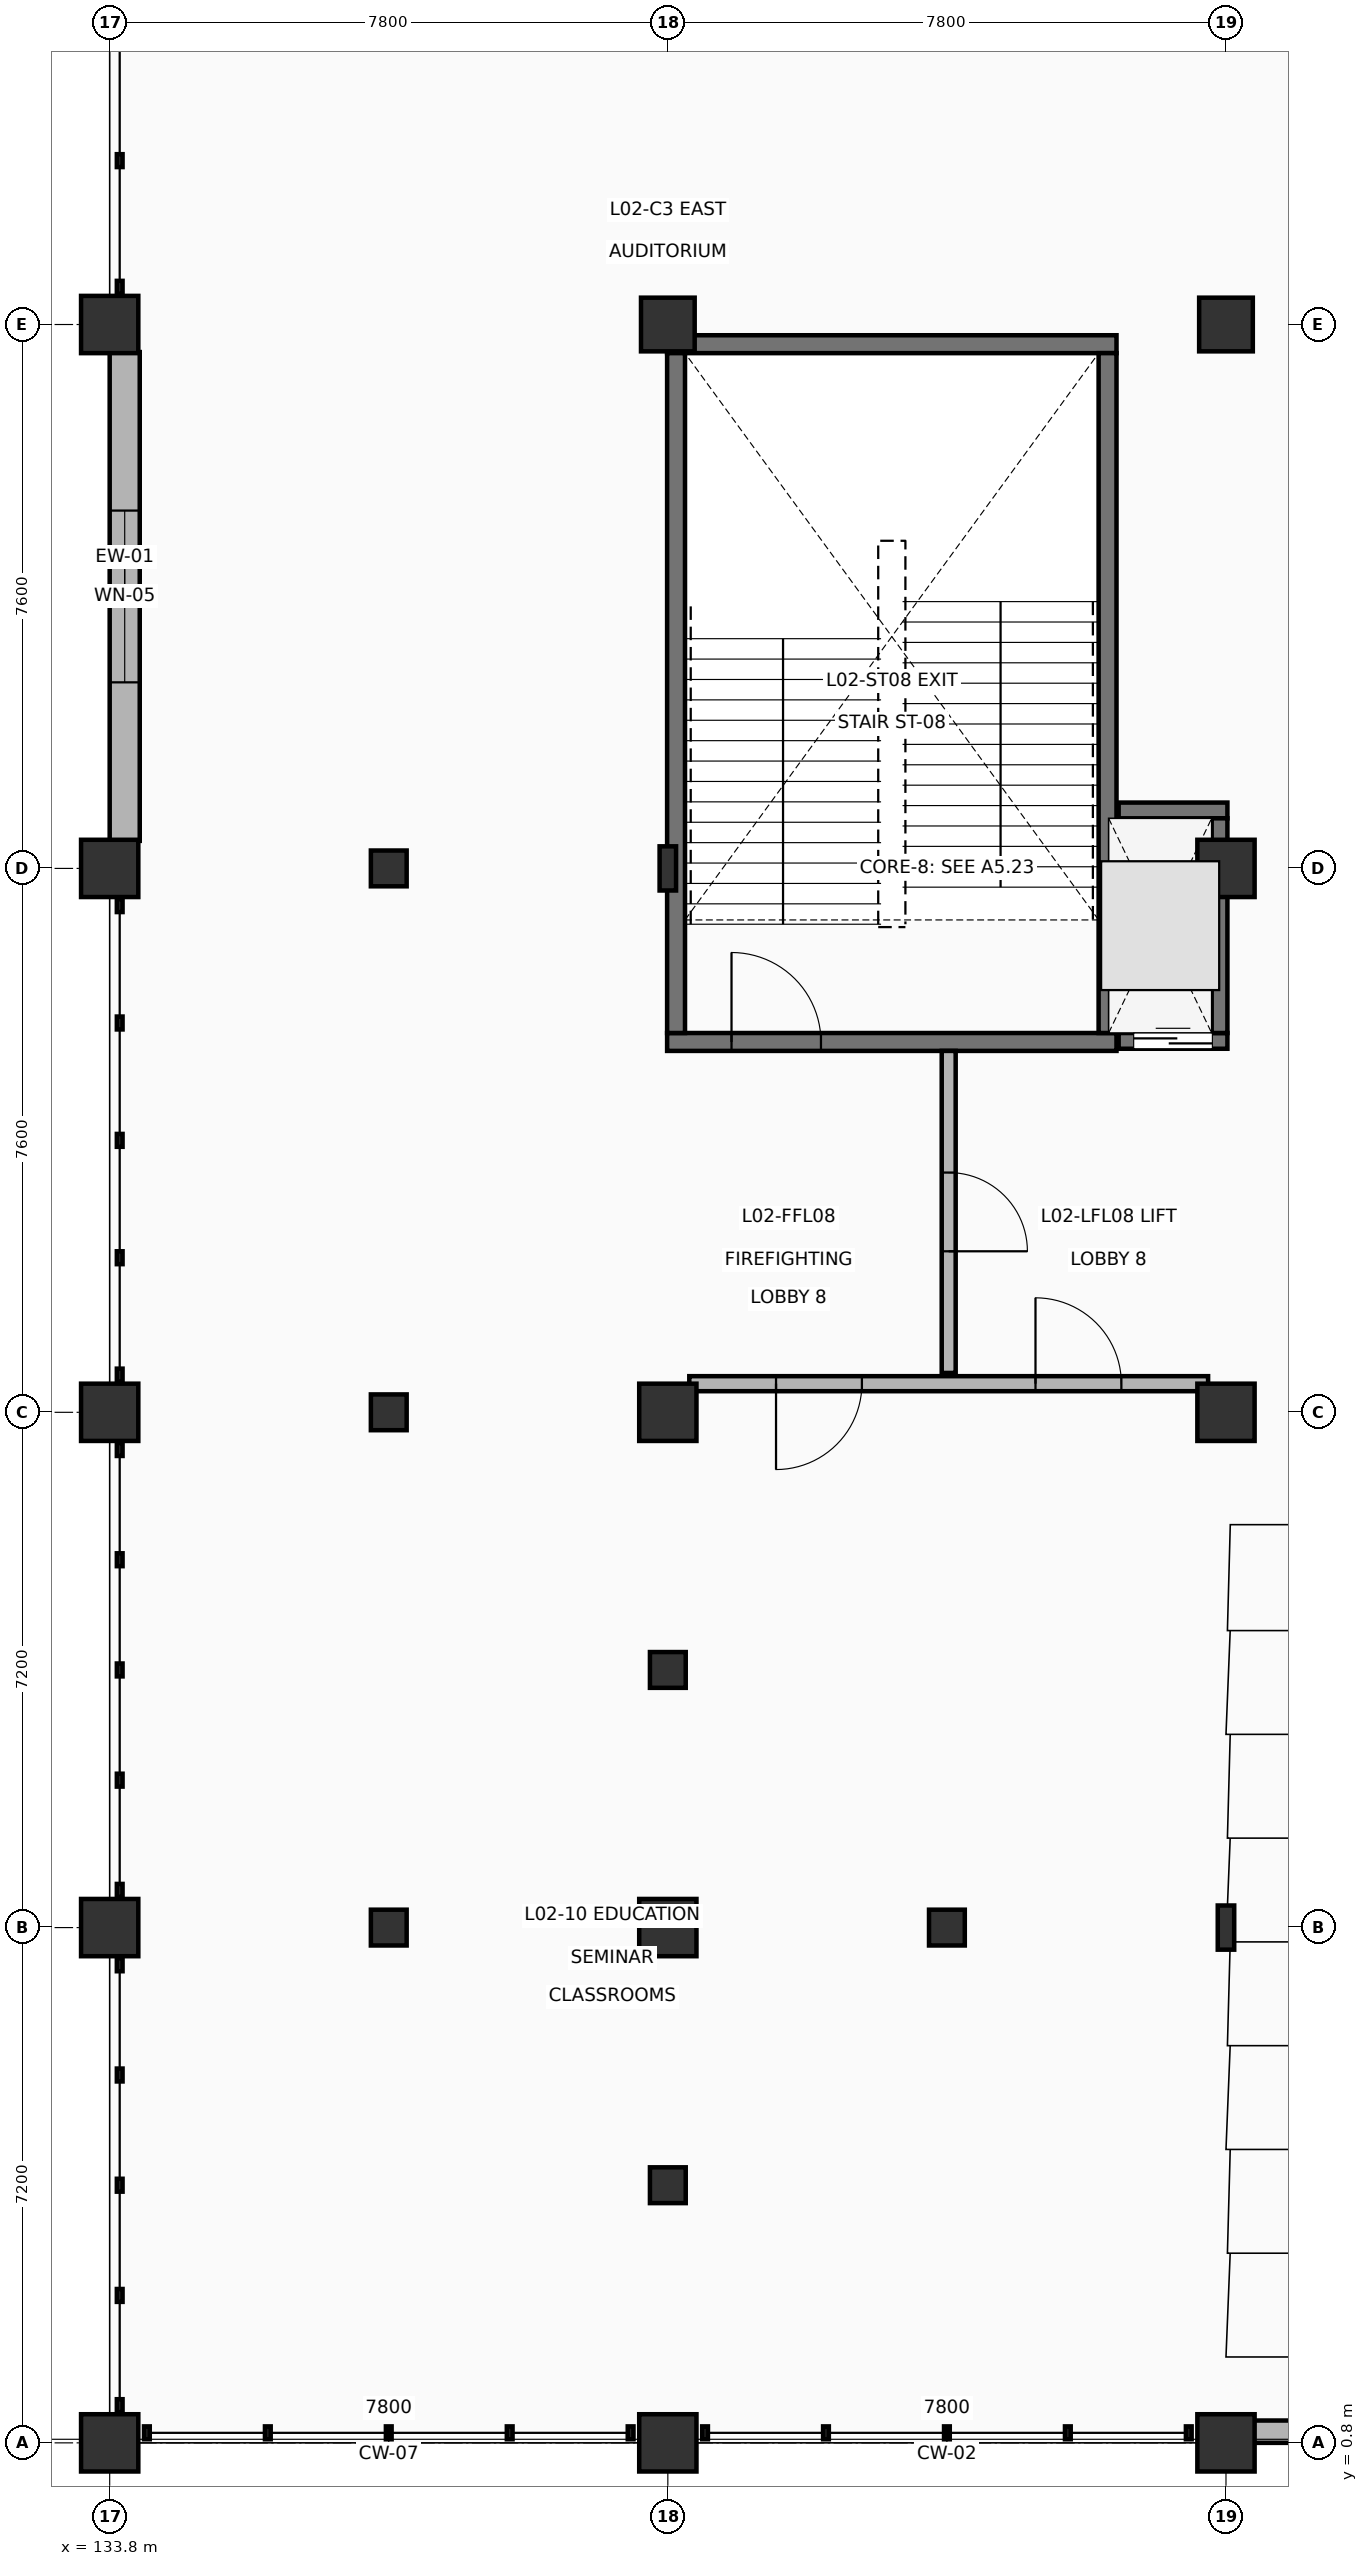
"""IFC4 building model, lengths in metres.
Left out: names, types, materials, properties, quantities, classifications, styles, units other than length and angle.
Written with IfcOpenShell. Run it as: python <this file> out.ifc"""

import sys

from ifc_helpers import new_model, si_unit, direction, frame, frame_2d, origin, origin_2d, place, context, subcontext, project, spatial, rectangle, circle, i_section, extrude, element, fill, save


model = new_model("IFC4")
c1 = context("Model", 3, precision=1e-05, world=origin(), true_north=direction((0.0, 1.0)))
c2 = subcontext(c1, "Body", "Model", "MODEL_VIEW")
j1 = project(units=[si_unit("LENGTHUNIT", "METRE"), si_unit("PLANEANGLEUNIT", "RADIAN")], contexts=[c1])
p1 = place(None, origin())
s1 = spatial("IfcSite", under=j1, at=p1, CompositionType="ELEMENT")
p2 = place(p1, origin())
s2 = spatial("IfcBuilding", under=s1, at=p2, CompositionType="ELEMENT")
p3 = place(p2, frame((0.0, 0.0, 5.4)))
s3 = spatial("IfcBuildingStorey", under=s2, at=p3, CompositionType="ELEMENT", Elevation=5.4)
p4 = place(p3, frame((133.8, 0.8, 0.0), z_axis=(0.0, 0.0, 1.0), x_axis=(1.0, 0.0, 0.0)))
e1 = element("IfcColumn", 1, at=p4, inside=s3, PredefinedType="COLUMN", context=c2, shape_type="SweptSolid", body=[
    extrude(rectangle(XDim=0.8, YDim=0.8, at=origin_2d()), origin(), (0.0, 0.0, 1.0), 4.84),
])
for number, where, z_axis, x_axis in (
    (2, (133.8, 8.0, 0.0), (0.0, 0.0, 1.0), (1.0, 0.0, 0.0)),
    (3, (133.8, 15.2, 0.0), (0.0, 0.0, 1.0), (1.0, 0.0, 0.0)),
    (4, (133.8, 22.8, 0.0), (0.0, 0.0, 1.0), (1.0, 0.0, 0.0)),
    (5, (133.8, 30.4, 0.0), (0.0, 0.0, 1.0), (1.0, 0.0, 0.0)),
):
    element("IfcColumn", number, at=place(p3, frame(where, z_axis=z_axis, x_axis=x_axis)), inside=s3, PredefinedType="COLUMN", context=c2, shape_type="SweptSolid", body=[
        extrude(rectangle(XDim=0.8, YDim=0.8, at=origin_2d()), origin(), (0.0, 0.0, 1.0), 5.1),
    ])
p5 = place(p3, frame((141.6, 0.8, 0.0), z_axis=(0.0, 0.0, 1.0), x_axis=(1.0, 0.0, 0.0)))
e6 = element("IfcColumn", 6, at=p5, inside=s3, PredefinedType="COLUMN", context=c2, shape_type="SweptSolid", body=[
    extrude(rectangle(XDim=0.8, YDim=0.8, at=origin_2d()), origin(), (0.0, 0.0, 1.0), 4.84),
])
for number, where, z_axis, x_axis in (
    (7, (141.6, 8.0, 0.0), (0.0, 0.0, 1.0), (1.0, 0.0, 0.0)),
    (8, (141.6, 15.2, 0.0), (0.0, 0.0, 1.0), (1.0, 0.0, 0.0)),
):
    element("IfcColumn", number, at=place(p3, frame(where, z_axis=z_axis, x_axis=x_axis)), inside=s3, PredefinedType="COLUMN", context=c2, shape_type="SweptSolid", body=[
        extrude(rectangle(XDim=0.8, YDim=0.8, at=origin_2d()), origin(), (0.0, 0.0, 1.0), 5.1),
    ])
p6 = place(p3, frame((141.6, 22.8, 0.0), z_axis=(0.0, 0.0, 1.0), x_axis=(1.0, 0.0, 0.0)))
e9 = element("IfcColumn", 9, at=p6, inside=s3, PredefinedType="COLUMN", context=c2, shape_type="SweptSolid", body=[
    extrude(i_section(OverallWidth=0.23, OverallDepth=0.617, WebThickness=0.013, FlangeThickness=0.022, at=origin_2d()), origin(), (0.0, 0.0, 1.0), 5.1),
])
p7 = place(p3, frame((141.6, 30.4, 0.0), z_axis=(0.0, 0.0, 1.0), x_axis=(1.0, 0.0, 0.0)))
e10 = element("IfcColumn", 10, at=p7, inside=s3, PredefinedType="COLUMN", context=c2, shape_type="SweptSolid", body=[
    extrude(circle(Radius=0.375, at=origin_2d()), origin(), (0.0, 0.0, 1.0), 5.1),
])
p8 = place(p3, frame((149.4, 0.8, 0.0), z_axis=(0.0, 0.0, 1.0), x_axis=(1.0, 0.0, 0.0)))
e11 = element("IfcColumn", 11, at=p8, inside=s3, PredefinedType="COLUMN", context=c2, shape_type="SweptSolid", body=[
    extrude(rectangle(XDim=0.8, YDim=0.8, at=origin_2d()), origin(), (0.0, 0.0, 1.0), 4.84),
])
p9 = place(p3, frame((149.4, 8.0, 0.0), z_axis=(0.0, 0.0, 1.0), x_axis=(1.0, 0.0, 0.0)))
e12 = element("IfcColumn", 12, at=p9, inside=s3, PredefinedType="COLUMN", context=c2, shape_type="SweptSolid", body=[
    extrude(i_section(OverallWidth=0.23, OverallDepth=0.617, WebThickness=0.013, FlangeThickness=0.022, at=origin_2d()), origin(), (0.0, 0.0, 1.0), 5.1),
])
for number, where, z_axis, x_axis in (
    (13, (149.4, 15.2, 0.0), (0.0, 0.0, 1.0), (1.0, 0.0, 0.0)),
    (14, (149.4, 22.8, 0.0), (0.0, 0.0, 1.0), (1.0, 0.0, 0.0)),
):
    element("IfcColumn", number, at=place(p3, frame(where, z_axis=z_axis, x_axis=x_axis)), inside=s3, PredefinedType="COLUMN", context=c2, shape_type="SweptSolid", body=[
        extrude(rectangle(XDim=0.8, YDim=0.8, at=origin_2d()), origin(), (0.0, 0.0, 1.0), 5.1),
    ])
p10 = place(p3, frame((149.4, 30.4, 0.0), z_axis=(0.0, 0.0, 1.0), x_axis=(1.0, 0.0, 0.0)))
e15 = element("IfcColumn", 15, at=p10, inside=s3, PredefinedType="COLUMN", context=c2, shape_type="SweptSolid", body=[
    extrude(circle(Radius=0.375, at=origin_2d()), origin(), (0.0, 0.0, 1.0), 4.84),
])
for number, where, z_axis, x_axis in (
    (16, (137.7, 8.0, 0.0), (0.0, 0.0, 1.0), (1.0, 0.0, 0.0)),
    (17, (137.7, 15.2, 0.0), (0.0, 0.0, 1.0), (1.0, 0.0, 0.0)),
    (18, (137.7, 22.8, 0.0), (0.0, 0.0, 1.0), (1.0, 0.0, 0.0)),
    (19, (145.5, 8.0, 0.0), (0.0, 0.0, 1.0), (1.0, 0.0, 0.0)),
    (20, (141.6, 4.4, 0.0), (0.0, 0.0, 1.0), (1.0, 0.0, 0.0)),
    (21, (141.6, 11.6, 0.0), (0.0, 0.0, 1.0), (1.0, 0.0, 0.0)),
):
    element("IfcColumn", number, at=place(p3, frame(where, z_axis=z_axis, x_axis=x_axis)), inside=s3, PredefinedType="COLUMN", context=c2, shape_type="SweptSolid", body=[
        extrude(rectangle(XDim=0.5, YDim=0.5, at=origin_2d()), origin(), (0.0, 0.0, 1.0), 4.84),
    ])
p11 = place(p3, frame((156.815, 0.956, 0.0), z_axis=(0.0, 0.0, 1.0), x_axis=(-1.0, 0.0, 0.0)))
e22 = element("IfcWall", 22, at=p11, inside=s3, PredefinedType="SOLIDWALL", context=c2, shape_type="SweptSolid", body=[
    extrude(rectangle(XDim=7.03, YDim=0.312, at=frame_2d((3.515, 0.0))), origin(), (0.0, 0.0, 1.0), 4.585),
])
p12 = place(p3, frame((134.01, 23.185, 0.0), z_axis=(0.0, 0.0, 1.0), x_axis=(0.0, 1.0, 0.0)))
e23 = element("IfcWall", 23, at=p12, inside=s3, PredefinedType="SOLIDWALL", context=c2, shape_type="SweptSolid", body=[
    extrude(rectangle(XDim=6.83, YDim=0.42, at=frame_2d((3.415, 0.0))), origin(), (0.0, 0.0, 1.0), 4.585),
])
p13 = place(p12, frame((2.215, 0.0, 0.95)))
e24 = element("IfcOpeningElement", 24, at=p13, cuts=e23, PredefinedType="OPENING", context=c2, shape_type="SweptSolid", body=[
    extrude(rectangle(XDim=2.4, YDim=2.1, at=frame_2d((1.2, 1.05))), frame((0.0, 0.22, 0.0), z_axis=(0.0, -1.0, 0.0), x_axis=(1.0, 0.0, 0.0)), (0.0, 0.0, 1.0), 0.44),
])
p14 = place(p3, frame((141.59, 20.375, 0.0), z_axis=(0.0, 0.0, 1.0), x_axis=(1.0, 0.0, 0.0)))
e25 = element("IfcWall", 25, at=p14, inside=s3, PredefinedType="SHEAR", context=c2, shape_type="SweptSolid", body=[
    extrude(rectangle(XDim=6.28, YDim=0.25, at=frame_2d((3.14, 0.0))), origin(), (0.0, 0.0, 1.0), 4.84),
])
p15 = place(p14, frame((0.9, 0.0, 0.0)))
e26 = element("IfcOpeningElement", 26, at=p15, cuts=e25, PredefinedType="OPENING", context=c2, shape_type="SweptSolid", body=[
    extrude(rectangle(XDim=1.25, YDim=2.2, at=frame_2d((0.625, 1.1))), frame((0.0, 0.135, 0.0), z_axis=(0.0, -1.0, 0.0), x_axis=(1.0, 0.0, 0.0)), (0.0, 0.0, 1.0), 0.27),
])
p16 = place(p3, frame((141.59, 30.125, 0.0), z_axis=(0.0, 0.0, 1.0), x_axis=(1.0, 0.0, 0.0)))
e27 = element("IfcWall", 27, at=p16, inside=s3, PredefinedType="SHEAR", context=c2, shape_type="SweptSolid", body=[
    extrude(rectangle(XDim=6.28, YDim=0.25, at=frame_2d((3.14, 0.0))), origin(), (0.0, 0.0, 1.0), 4.84),
])
for number, where, z_axis, x_axis in (
    (28, (141.715, 20.5, 0.0), (0.0, 0.0, 1.0), (0.0, 1.0, 0.0)),
    (29, (147.745, 20.5, 0.0), (0.0, 0.0, 1.0), (0.0, 1.0, 0.0)),
):
    element("IfcWall", number, at=place(p3, frame(where, z_axis=z_axis, x_axis=x_axis)), inside=s3, PredefinedType="SHEAR", context=c2, shape_type="SweptSolid", body=[
        extrude(rectangle(XDim=9.5, YDim=0.25, at=frame_2d((4.75, 0.0))), origin(), (0.0, 0.0, 1.0), 4.84),
    ])
p17 = place(p3, frame((147.9, 20.39, 0.0), z_axis=(0.0, 0.0, 1.0), x_axis=(1.0, 0.0, 0.0)))
e30 = element("IfcWall", 30, at=p17, inside=s3, PredefinedType="SHEAR", context=c2, shape_type="SweptSolid", body=[
    extrude(rectangle(XDim=1.52, YDim=0.22, at=frame_2d((0.76, 0.0))), origin(), (0.0, 0.0, 1.0), 4.84),
])
p18 = place(p17, frame((0.21, 0.0, 0.0)))
e31 = element("IfcOpeningElement", 31, at=p18, cuts=e30, PredefinedType="OPENING", context=c2, shape_type="SweptSolid", body=[
    extrude(rectangle(XDim=1.1, YDim=2.15, at=frame_2d((0.55, 1.075))), frame((0.0, 0.12, 0.0), z_axis=(0.0, -1.0, 0.0), x_axis=(1.0, 0.0, 0.0)), (0.0, 0.0, 1.0), 0.24),
])
p19 = place(p3, frame((147.9, 23.61, 0.0), z_axis=(0.0, 0.0, 1.0), x_axis=(1.0, 0.0, 0.0)))
e32 = element("IfcWall", 32, at=p19, inside=s3, PredefinedType="SHEAR", context=c2, shape_type="SweptSolid", body=[
    extrude(rectangle(XDim=1.52, YDim=0.22, at=frame_2d((0.76, 0.0))), origin(), (0.0, 0.0, 1.0), 4.84),
])
p20 = place(p3, frame((149.31, 20.5, 0.0), z_axis=(0.0, 0.0, 1.0), x_axis=(0.0, 1.0, 0.0)))
e33 = element("IfcWall", 33, at=p20, inside=s3, PredefinedType="SHEAR", context=c2, shape_type="SweptSolid", body=[
    extrude(rectangle(XDim=3.0, YDim=0.22, at=frame_2d((1.5, 0.0))), origin(), (0.0, 0.0, 1.0), 4.84),
])
p21 = place(p3, frame((141.9, 15.6, 0.0), z_axis=(0.0, 0.0, 1.0), x_axis=(1.0, 0.0, 0.0)))
e34 = element("IfcWall", 34, at=p21, inside=s3, PredefinedType="PARTITIONING", context=c2, shape_type="SweptSolid", body=[
    extrude(rectangle(XDim=7.25, YDim=0.21, at=frame_2d((3.625, 0.0))), origin(), (0.0, 0.0, 1.0), 4.84),
])
p22 = place(p21, frame((1.212, 0.0, 0.0)))
e35 = element("IfcOpeningElement", 35, at=p22, cuts=e34, PredefinedType="OPENING", context=c2, shape_type="SweptSolid", body=[
    extrude(rectangle(XDim=1.2, YDim=2.2, at=frame_2d((0.6, 1.1))), frame((0.0, 0.115, 0.0), z_axis=(0.0, -1.0, 0.0), x_axis=(1.0, 0.0, 0.0)), (0.0, 0.0, 1.0), 0.23),
])
p23 = place(p21, frame((4.838, 0.0, 0.0)))
e36 = element("IfcOpeningElement", 36, at=p23, cuts=e34, PredefinedType="OPENING", context=c2, shape_type="SweptSolid", body=[
    extrude(rectangle(XDim=1.2, YDim=2.2, at=frame_2d((0.6, 1.1))), frame((0.0, 0.115, 0.0), z_axis=(0.0, -1.0, 0.0), x_axis=(1.0, 0.0, 0.0)), (0.0, 0.0, 1.0), 0.23),
])
p24 = place(p3, frame((145.525, 15.75, 0.0), z_axis=(0.0, 0.0, 1.0), x_axis=(0.0, 1.0, 0.0)))
e37 = element("IfcWall", 37, at=p24, inside=s3, PredefinedType="PARTITIONING", context=c2, shape_type="SweptSolid", body=[
    extrude(rectangle(XDim=4.5, YDim=0.195, at=frame_2d((2.25, 0.0))), origin(), (0.0, 0.0, 1.0), 4.84),
])
p25 = place(p24, frame((1.7, 0.0, 0.0)))
e38 = element("IfcOpeningElement", 38, at=p25, cuts=e37, PredefinedType="OPENING", context=c2, shape_type="SweptSolid", body=[
    extrude(rectangle(XDim=1.1, YDim=2.15, at=frame_2d((0.55, 1.075))), frame((0.0, 0.107, 0.0), z_axis=(0.0, -1.0, 0.0), x_axis=(1.0, 0.0, 0.0)), (0.0, 0.0, 1.0), 0.215),
])
p26 = place(p13, origin())
e39 = element("IfcWindow", 39, at=p26, inside=s3, PartitioningType="SINGLE_PANEL", PredefinedType="WINDOW", context=c2, shape_type="SweptSolid", body=[
    extrude(rectangle(XDim=2.4, YDim=2.1, at=frame_2d((1.2, 1.05))), frame((0.0, 0.03, 0.0), z_axis=(0.0, -1.0, 0.0), x_axis=(1.0, 0.0, 0.0)), (0.0, 0.0, 1.0), 0.06),
])
fill(e24, e39)
p27 = place(p15, origin())
e40 = element("IfcDoor", 40, at=p27, inside=s3, OperationType="SINGLE_SWING_LEFT", PredefinedType="DOOR", context=c2, shape_type="SweptSolid", body=[
    extrude(rectangle(XDim=1.25, YDim=2.2, at=frame_2d((0.625, 1.1))), frame((0.0, 0.025, 0.0), z_axis=(0.0, -1.0, 0.0), x_axis=(1.0, 0.0, 0.0)), (0.0, 0.0, 1.0), 0.05),
])
fill(e26, e40)
p28 = place(p18, origin())
e41 = element("IfcDoor", 41, at=p28, inside=s3, OperationType="DOUBLE_DOOR_SLIDING", PredefinedType="DOOR", context=c2, shape_type="SweptSolid", body=[
    extrude(rectangle(XDim=1.1, YDim=2.15, at=frame_2d((0.55, 1.075))), frame((0.0, 0.025, 0.0), z_axis=(0.0, -1.0, 0.0), x_axis=(1.0, 0.0, 0.0)), (0.0, 0.0, 1.0), 0.05),
])
fill(e31, e41)
p29 = place(p22, origin())
e42 = element("IfcDoor", 42, at=p29, inside=s3, OperationType="SINGLE_SWING_RIGHT", PredefinedType="DOOR", context=c2, shape_type="SweptSolid", body=[
    extrude(rectangle(XDim=1.2, YDim=2.2, at=frame_2d((0.6, 1.1))), frame((0.0, 0.025, 0.0), z_axis=(0.0, -1.0, 0.0), x_axis=(1.0, 0.0, 0.0)), (0.0, 0.0, 1.0), 0.05),
])
fill(e35, e42)
p30 = place(p23, origin())
e43 = element("IfcDoor", 43, at=p30, inside=s3, OperationType="SINGLE_SWING_LEFT", PredefinedType="DOOR", context=c2, shape_type="SweptSolid", body=[
    extrude(rectangle(XDim=1.2, YDim=2.2, at=frame_2d((0.6, 1.1))), frame((0.0, 0.025, 0.0), z_axis=(0.0, -1.0, 0.0), x_axis=(1.0, 0.0, 0.0)), (0.0, 0.0, 1.0), 0.05),
])
fill(e36, e43)
p31 = place(p25, origin())
e44 = element("IfcDoor", 44, at=p31, inside=s3, OperationType="SINGLE_SWING_RIGHT", PredefinedType="DOOR", context=c2, shape_type="SweptSolid", body=[
    extrude(rectangle(XDim=1.1, YDim=2.15, at=frame_2d((0.55, 1.075))), frame((0.0, 0.025, 0.0), z_axis=(0.0, -1.0, 0.0), x_axis=(1.0, 0.0, 0.0)), (0.0, 0.0, 1.0), 0.05),
])
fill(e38, e44)
save(model, sys.argv[1])
